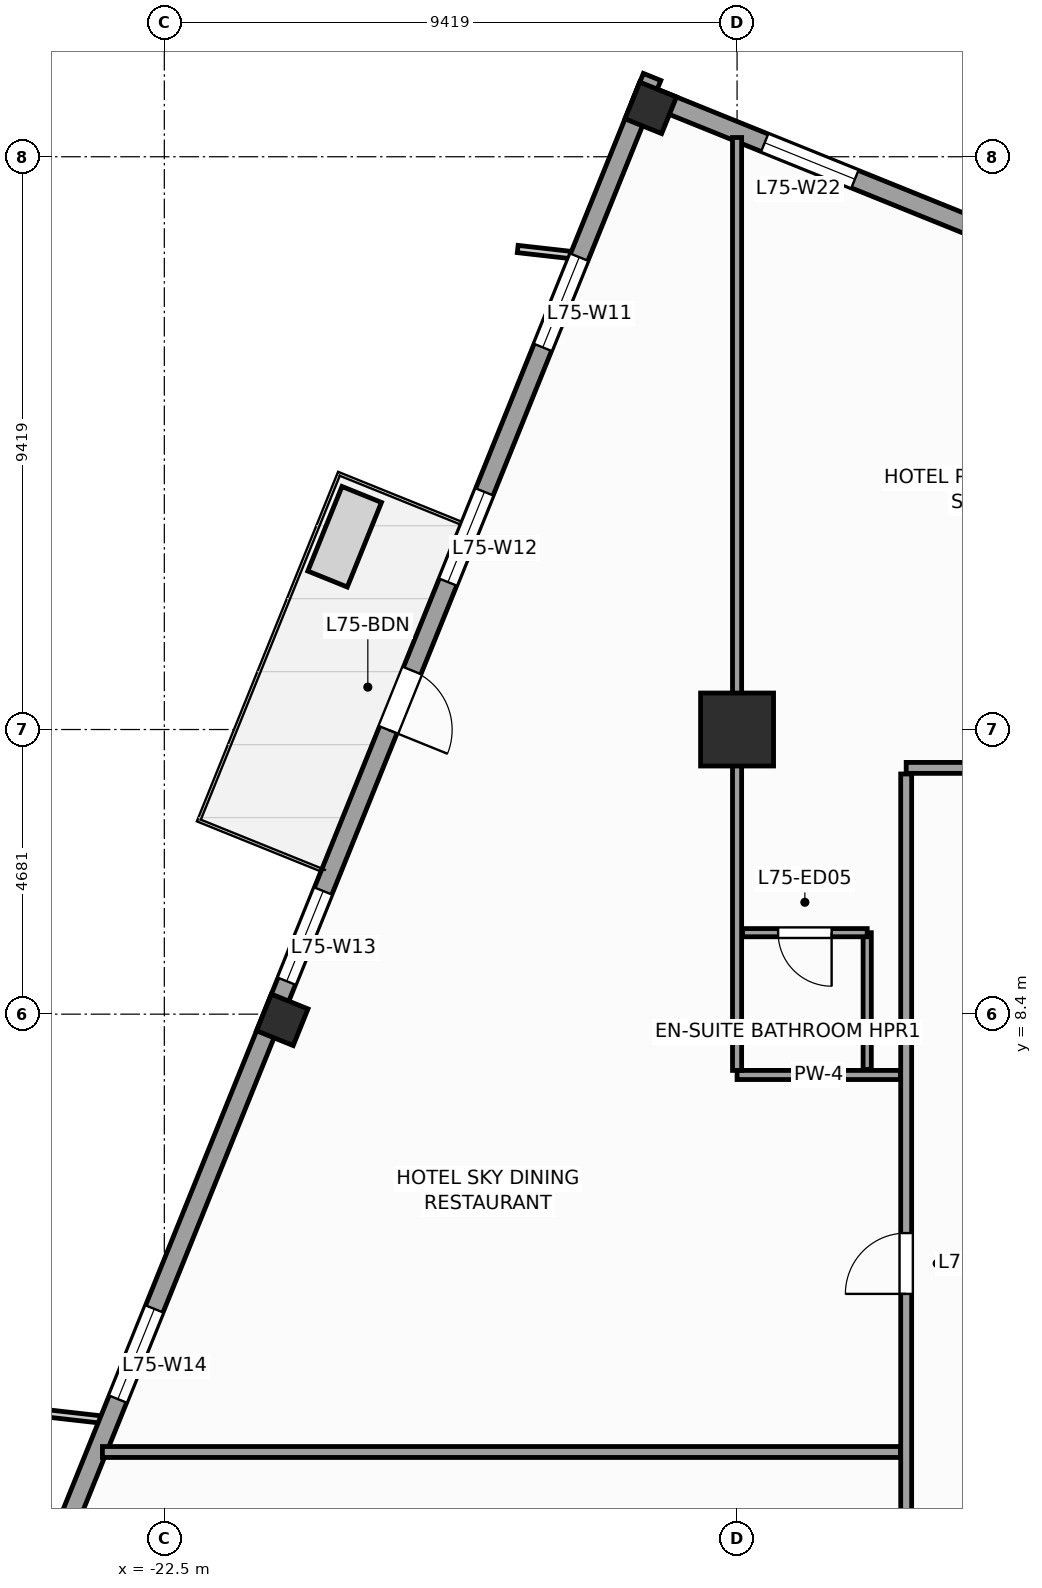
"""IFC4 building model, lengths in metres.
Left out: names, types, materials, properties, quantities, classifications, styles, units other than length and angle.
Written with IfcOpenShell. Run it as: python <this file> out.ifc"""

import sys

from ifc_helpers import new_model, si_unit, direction, frame, frame_2d, origin, origin_2d, place, context, subcontext, project, spatial, rectangle, extrude, source, transform, mapped, element, fill, save


model = new_model("IFC4")
c1 = context("Model", 3, precision=1e-05, world=origin(), true_north=direction((0.0, 1.0)))
c2 = subcontext(c1, "Body", "Model", "MODEL_VIEW")
j1 = project(units=[si_unit("LENGTHUNIT", "METRE"), si_unit("PLANEANGLEUNIT", "RADIAN")], contexts=[c1])
p1 = place(None, origin())
s1 = spatial("IfcSite", under=j1, at=p1, CompositionType="ELEMENT")
p2 = place(p1, origin())
s2 = spatial("IfcBuilding", under=s1, at=p2, CompositionType="ELEMENT")
p3 = place(p2, frame((0.0, 0.0, 304.8)))
s3 = spatial("IfcBuildingStorey", under=s2, at=p3, CompositionType="ELEMENT", Elevation=304.8)
m1 = source(origin(), c2, "Body", "SweptSolid", [
    extrude(rectangle(XDim=1.2, YDim=1.2, at=origin_2d()), origin(), (0.0, 0.0, 1.0), 3.6),
])
p4 = place(p3, frame((-13.081, 13.081, 0.0), z_axis=(0.0, 0.0, 1.0), x_axis=(1.0, 0.0, 0.0)))
e1 = element("IfcColumn", 1, at=p4, inside=s3, PredefinedType="COLUMN", context=c2, shape_type="MappedRepresentation", body=[
    mapped(m1, transform((0.0, 0.0, 0.0), scale=1.0)),
])
m2 = source(origin(), c2, "Body", "SweptSolid", [
    extrude(rectangle(XDim=0.65, YDim=0.65, at=origin_2d()), origin(), (0.0, 0.0, 1.0), 3.6),
])
for number, where, z_axis, x_axis in (
    (2, (-14.501, 23.304, 0.0), (0.0, 0.0, 1.0), (0.375, 0.927, 0.0)),
    (3, (-20.56, 8.307, 0.0), (0.0, 0.0, 1.0), (0.375, 0.927, 0.0)),
):
    element("IfcColumn", number, at=place(p3, frame(where, z_axis=z_axis, x_axis=x_axis)), inside=s3, PredefinedType="COLUMN", context=c2, shape_type="MappedRepresentation", body=[
        mapped(m2, transform((0.0, 0.0, 0.0), scale=1.0)),
    ])
p5 = place(p3, frame((-9.032, 21.278, 0.0), z_axis=(0.0, 0.0, 1.0), x_axis=(-0.927185411764, 0.374602739196, 0.0)))
e4 = element("IfcWall", 4, at=p5, inside=s3, PredefinedType="STANDARD", context=c2, shape_type="SweptSolid", body=[
    extrude(rectangle(XDim=6.155, YDim=0.31, at=frame_2d((3.078, 0.0))), origin(), (0.0, 0.0, 1.0), 3.35),
])
p6 = place(p5, frame((2.278, 0.0, 0.47)))
e5 = element("IfcOpeningElement", 5, at=p6, cuts=e4, PredefinedType="OPENING", context=c2, shape_type="SweptSolid", body=[
    extrude(rectangle(XDim=1.6, YDim=2.1, at=frame_2d((0.8, 1.05))), frame((0.0, 0.165, 0.0), z_axis=(0.0, -1.0, 0.0), x_axis=(1.0, 0.0, 0.0)), (0.0, 0.0, 1.0), 0.33),
])
p7 = place(p3, frame((-14.479, 23.813, 0.0), z_axis=(0.0, 0.0, 1.0), x_axis=(-0.374609557019, -0.927182657188, 0.0)))
e6 = element("IfcWall", 6, at=p7, inside=s3, PredefinedType="STANDARD", context=c2, shape_type="SweptSolid", body=[
    extrude(rectangle(XDim=33.31, YDim=0.31, at=frame_2d((16.655, 0.0))), origin(), (0.0, 0.0, 1.0), 2.75),
])
p8 = place(p7, frame((10.53, 0.0, 0.0)))
e7 = element("IfcOpeningElement", 7, at=p8, cuts=e6, PredefinedType="OPENING", context=c2, shape_type="SweptSolid", body=[
    extrude(rectangle(XDim=1.05, YDim=2.25, at=frame_2d((0.525, 1.125))), frame((0.0, 0.165, 0.0), z_axis=(0.0, -1.0, 0.0), x_axis=(1.0, 0.0, 0.0)), (0.0, 0.0, 1.0), 0.33),
])
p9 = place(p7, frame((3.197, 0.0, 0.47)))
e8 = element("IfcOpeningElement", 8, at=p9, cuts=e6, PredefinedType="OPENING", context=c2, shape_type="SweptSolid", body=[
    extrude(rectangle(XDim=1.6, YDim=2.1, at=frame_2d((0.8, 1.05))), frame((0.0, 0.165, 0.0), z_axis=(0.0, -1.0, 0.0), x_axis=(1.0, 0.0, 0.0)), (0.0, 0.0, 1.0), 0.33),
])
p10 = place(p7, frame((7.36, 0.0, 0.47)))
e9 = element("IfcOpeningElement", 9, at=p10, cuts=e6, PredefinedType="OPENING", context=c2, shape_type="SweptSolid", body=[
    extrude(rectangle(XDim=1.6, YDim=2.1, at=frame_2d((0.8, 1.05))), frame((0.0, 0.165, 0.0), z_axis=(0.0, -1.0, 0.0), x_axis=(1.0, 0.0, 0.0)), (0.0, 0.0, 1.0), 0.33),
])
p11 = place(p7, frame((14.439, 0.0, 0.47)))
e10 = element("IfcOpeningElement", 10, at=p11, cuts=e6, PredefinedType="OPENING", context=c2, shape_type="SweptSolid", body=[
    extrude(rectangle(XDim=1.6, YDim=2.1, at=frame_2d((0.8, 1.05))), frame((0.0, 0.165, 0.0), z_axis=(0.0, -1.0, 0.0), x_axis=(1.0, 0.0, 0.0)), (0.0, 0.0, 1.0), 0.33),
])
p12 = place(p7, frame((21.851, 0.0, 0.47)))
e11 = element("IfcOpeningElement", 11, at=p12, cuts=e6, PredefinedType="OPENING", context=c2, shape_type="SweptSolid", body=[
    extrude(rectangle(XDim=1.6, YDim=2.1, at=frame_2d((0.8, 1.05))), frame((0.0, 0.165, 0.0), z_axis=(0.0, -1.0, 0.0), x_axis=(1.0, 0.0, 0.0)), (0.0, 0.0, 1.0), 0.33),
])
p13 = place(p7, frame((30.097, 0.0, 0.47)))
e12 = element("IfcOpeningElement", 12, at=p13, cuts=e6, PredefinedType="OPENING", context=c2, shape_type="SweptSolid", body=[
    extrude(rectangle(XDim=1.6, YDim=2.1, at=frame_2d((0.8, 1.05))), frame((0.0, 0.165, 0.0), z_axis=(0.0, -1.0, 0.0), x_axis=(1.0, 0.0, 0.0)), (0.0, 0.0, 1.0), 0.33),
])
p14 = place(p7, frame((27.374, 0.0, 0.47)))
e13 = element("IfcOpeningElement", 13, at=p14, cuts=e6, PredefinedType="OPENING", context=c2, shape_type="SweptSolid", body=[
    extrude(rectangle(XDim=1.6, YDim=2.1, at=frame_2d((0.8, 1.05))), frame((0.0, 0.165, 0.0), z_axis=(0.0, -1.0, 0.0), x_axis=(1.0, 0.0, 0.0)), (0.0, 0.0, 1.0), 0.33),
])
p15 = place(p3, frame((-10.3, 12.45, 0.0), z_axis=(0.0, 0.0, 1.0), x_axis=(1.0, 0.0, 0.0)))
e14 = element("IfcWall", 14, at=p15, inside=s3, PredefinedType="PARTITIONING", context=c2, shape_type="SweptSolid", body=[
    extrude(rectangle(XDim=20.6, YDim=0.18, at=frame_2d((10.3, 0.0))), origin(), (0.0, 0.0, 1.0), 3.35),
])
p16 = place(p15, frame((15.036, 0.0, 0.0)))
e15 = element("IfcOpeningElement", 15, at=p16, cuts=e14, PredefinedType="OPENING", context=c2, shape_type="SweptSolid", body=[
    extrude(rectangle(XDim=0.95, YDim=2.1, at=frame_2d((0.475, 1.05))), frame((0.0, 0.1, 0.0), z_axis=(0.0, -1.0, 0.0), x_axis=(1.0, 0.0, 0.0)), (0.0, 0.0, 1.0), 0.2),
])
p17 = place(p15, frame((3.314, 0.0, 0.0)))
e16 = element("IfcOpeningElement", 16, at=p17, cuts=e14, PredefinedType="OPENING", context=c2, shape_type="SweptSolid", body=[
    extrude(rectangle(XDim=1.0, YDim=2.15, at=frame_2d((0.5, 1.075))), frame((0.0, 0.1, 0.0), z_axis=(0.0, -1.0, 0.0), x_axis=(1.0, 0.0, 0.0)), (0.0, 0.0, 1.0), 0.2),
])
p18 = place(p15, frame((10.05, 0.0, 0.0)))
e17 = element("IfcOpeningElement", 17, at=p18, cuts=e14, PredefinedType="OPENING", context=c2, shape_type="SweptSolid", body=[
    extrude(rectangle(XDim=1.0, YDim=2.15, at=frame_2d((0.5, 1.075))), frame((0.0, 0.1, 0.0), z_axis=(0.0, -1.0, 0.0), x_axis=(1.0, 0.0, 0.0)), (0.0, 0.0, 1.0), 0.2),
])
p19 = place(p3, frame((-10.3, -12.35, 0.0), z_axis=(0.0, 0.0, 1.0), x_axis=(0.0, 1.0, 0.0)))
e18 = element("IfcWall", 18, at=p19, inside=s3, PredefinedType="PARTITIONING", context=c2, shape_type="SweptSolid", body=[
    extrude(rectangle(XDim=24.7, YDim=0.18, at=frame_2d((12.35, 0.0))), origin(), (0.0, 0.0, 1.0), 3.35),
])
p20 = place(p19, frame((16.15, 0.0, 0.0)))
e19 = element("IfcOpeningElement", 19, at=p20, cuts=e18, PredefinedType="OPENING", context=c2, shape_type="SweptSolid", body=[
    extrude(rectangle(XDim=1.0, YDim=2.15, at=frame_2d((0.5, 1.075))), frame((0.0, 0.1, 0.0), z_axis=(0.0, -1.0, 0.0), x_axis=(1.0, 0.0, 0.0)), (0.0, 0.0, 1.0), 0.2),
])
p21 = place(p19, frame((2.139, 0.0, 0.0)))
e20 = element("IfcOpeningElement", 20, at=p21, cuts=e18, PredefinedType="OPENING", context=c2, shape_type="SweptSolid", body=[
    extrude(rectangle(XDim=1.0, YDim=2.15, at=frame_2d((0.5, 1.075))), frame((0.0, 0.1, 0.0), z_axis=(0.0, -1.0, 0.0), x_axis=(1.0, 0.0, 0.0)), (0.0, 0.0, 1.0), 0.2),
])
p22 = place(p19, frame((6.35, 0.0, 0.0)))
e21 = element("IfcOpeningElement", 21, at=p22, cuts=e18, PredefinedType="OPENING", context=c2, shape_type="SweptSolid", body=[
    extrude(rectangle(XDim=1.0, YDim=2.15, at=frame_2d((0.5, 1.075))), frame((0.0, 0.1, 0.0), z_axis=(0.0, -1.0, 0.0), x_axis=(1.0, 0.0, 0.0)), (0.0, 0.0, 1.0), 0.2),
])
p23 = place(p19, frame((10.65, 0.0, 0.0)))
e22 = element("IfcOpeningElement", 22, at=p23, cuts=e18, PredefinedType="OPENING", context=c2, shape_type="SweptSolid", body=[
    extrude(rectangle(XDim=1.0, YDim=2.15, at=frame_2d((0.5, 1.075))), frame((0.0, 0.1, 0.0), z_axis=(0.0, -1.0, 0.0), x_axis=(1.0, 0.0, 0.0)), (0.0, 0.0, 1.0), 0.2),
])
p24 = place(p3, frame((-10.395, 1.2, 0.0), z_axis=(0.0, 0.0, 1.0), x_axis=(-1.0, 0.0, 0.0)))
e23 = element("IfcWall", 23, at=p24, inside=s3, PredefinedType="PARTITIONING", context=c2, shape_type="SweptSolid", body=[
    extrude(rectangle(XDim=13.123, YDim=0.18, at=frame_2d((6.562, 0.0))), origin(), (0.0, 0.0, 1.0), 3.35),
])
p25 = place(p3, frame((-10.395, 7.4, 0.0), z_axis=(0.0, 0.0, 1.0), x_axis=(-1.0, 0.0, 0.0)))
e24 = element("IfcWall", 24, at=p25, inside=s3, PredefinedType="PARTITIONING", context=c2, shape_type="SweptSolid", body=[
    extrude(rectangle(XDim=2.686, YDim=0.15, at=frame_2d((1.343, 0.0))), origin(), (0.0, 0.0, 1.0), 3.35),
])
p26 = place(p3, frame((-13.081, 7.475, 0.0), z_axis=(0.0, 0.0, 1.0), x_axis=(0.0, 1.0, 0.0)))
e25 = element("IfcWall", 25, at=p26, inside=s3, PredefinedType="PARTITIONING", context=c2, shape_type="SweptSolid", body=[
    extrude(rectangle(XDim=15.342, YDim=0.15, at=frame_2d((7.671, 0.0))), origin(), (0.0, 0.0, 1.0), 2.45),
])
p27 = place(p3, frame((-10.941, 7.49, 0.0), z_axis=(0.0, 0.0, 1.0), x_axis=(0.0, 1.0, 0.0)))
e26 = element("IfcWall", 26, at=p27, inside=s3, PredefinedType="PARTITIONING", context=c2, shape_type="SweptSolid", body=[
    extrude(rectangle(XDim=2.25, YDim=0.135, at=frame_2d((1.125, 0.0))), origin(), (0.0, 0.0, 1.0), 3.35),
])
p28 = place(p3, frame((-12.991, 9.74, 0.0), z_axis=(0.0, 0.0, 1.0), x_axis=(1.0, 0.0, 0.0)))
e27 = element("IfcWall", 27, at=p28, inside=s3, PredefinedType="PARTITIONING", context=c2, shape_type="SweptSolid", body=[
    extrude(rectangle(XDim=2.05, YDim=0.135, at=frame_2d((1.025, 0.0))), origin(), (0.0, 0.0, 1.0), 3.35),
])
p29 = place(p28, frame((0.585, 0.0, 0.0)))
e28 = element("IfcOpeningElement", 28, at=p29, cuts=e27, PredefinedType="OPENING", context=c2, shape_type="SweptSolid", body=[
    extrude(rectangle(XDim=0.88, YDim=2.1, at=frame_2d((0.44, 1.05))), frame((0.0, 0.078, 0.0), z_axis=(0.0, -1.0, 0.0), x_axis=(1.0, 0.0, 0.0)), (0.0, 0.0, 1.0), 0.155),
])
m3 = source(origin(), c2, "Body", "SweptSolid", [
    extrude(rectangle(XDim=1.05, YDim=2.25, at=frame_2d((0.525, 1.125))), frame((0.0, 0.025, 0.0), z_axis=(0.0, -1.0, 0.0), x_axis=(1.0, 0.0, 0.0)), (0.0, 0.0, 1.0), 0.05),
])
p30 = place(p8, origin())
e29 = element("IfcDoor", 29, at=p30, inside=s3, OperationType="SINGLE_SWING_RIGHT", PredefinedType="DOOR", context=c2, shape_type="MappedRepresentation", body=[
    mapped(m3, transform((0.0, 0.0, 0.0), scale=1.0)),
])
fill(e7, e29)
m4 = source(origin(), c2, "Body", "SweptSolid", [
    extrude(rectangle(XDim=1.6, YDim=2.1, at=frame_2d((0.8, 1.05))), frame((0.0, 0.03, 0.0), z_axis=(0.0, -1.0, 0.0), x_axis=(1.0, 0.0, 0.0)), (0.0, 0.0, 1.0), 0.06),
])
p31 = place(p9, origin())
e30 = element("IfcWindow", 30, at=p31, inside=s3, PartitioningType="SINGLE_PANEL", PredefinedType="WINDOW", context=c2, shape_type="MappedRepresentation", body=[
    mapped(m4, transform((0.0, 0.0, 0.0), scale=1.0)),
])
fill(e8, e30)
p32 = place(p10, origin())
e31 = element("IfcWindow", 31, at=p32, inside=s3, PartitioningType="SINGLE_PANEL", PredefinedType="WINDOW", context=c2, shape_type="MappedRepresentation", body=[
    mapped(m4, transform((0.0, 0.0, 0.0), scale=1.0)),
])
fill(e9, e31)
p33 = place(p11, origin())
e32 = element("IfcWindow", 32, at=p33, inside=s3, PartitioningType="SINGLE_PANEL", PredefinedType="WINDOW", context=c2, shape_type="MappedRepresentation", body=[
    mapped(m4, transform((0.0, 0.0, 0.0), scale=1.0)),
])
fill(e10, e32)
p34 = place(p12, origin())
e33 = element("IfcWindow", 33, at=p34, inside=s3, PartitioningType="SINGLE_PANEL", PredefinedType="WINDOW", context=c2, shape_type="MappedRepresentation", body=[
    mapped(m4, transform((0.0, 0.0, 0.0), scale=1.0)),
])
fill(e11, e33)
p35 = place(p6, origin())
e34 = element("IfcWindow", 34, at=p35, inside=s3, PartitioningType="SINGLE_PANEL", PredefinedType="WINDOW", context=c2, shape_type="MappedRepresentation", body=[
    mapped(m4, transform((0.0, 0.0, 0.0), scale=1.0)),
])
fill(e5, e34)
m5 = source(origin(), c2, "Body", "SweptSolid", [
    extrude(rectangle(XDim=1.0, YDim=2.15, at=frame_2d((0.5, 1.075))), frame((0.0, 0.025, 0.0), z_axis=(0.0, -1.0, 0.0), x_axis=(1.0, 0.0, 0.0)), (0.0, 0.0, 1.0), 0.05),
])
p36 = place(p20, origin())
e35 = element("IfcDoor", 35, at=p36, inside=s3, OperationType="SINGLE_SWING_LEFT", PredefinedType="DOOR", context=c2, shape_type="MappedRepresentation", body=[
    mapped(m5, transform((0.0, 0.0, 0.0), scale=1.0)),
])
fill(e19, e35)
m6 = source(origin(), c2, "Body", "SweptSolid", [
    extrude(rectangle(XDim=0.88, YDim=2.1, at=frame_2d((0.44, 1.05))), frame((0.0, 0.025, 0.0), z_axis=(0.0, -1.0, 0.0), x_axis=(1.0, 0.0, 0.0)), (0.0, 0.0, 1.0), 0.05),
])
p37 = place(p29, frame((0.88, 0.0, 0.0), z_axis=(0.0, 0.0, 1.0), x_axis=(-1.0, 0.0, 0.0)))
e36 = element("IfcDoor", 36, at=p37, inside=s3, OperationType="SINGLE_SWING_RIGHT", PredefinedType="DOOR", context=c2, shape_type="MappedRepresentation", body=[
    mapped(m6, transform((0.0, 0.0, 0.0), scale=1.0)),
])
fill(e28, e36)
save(model, sys.argv[1])
